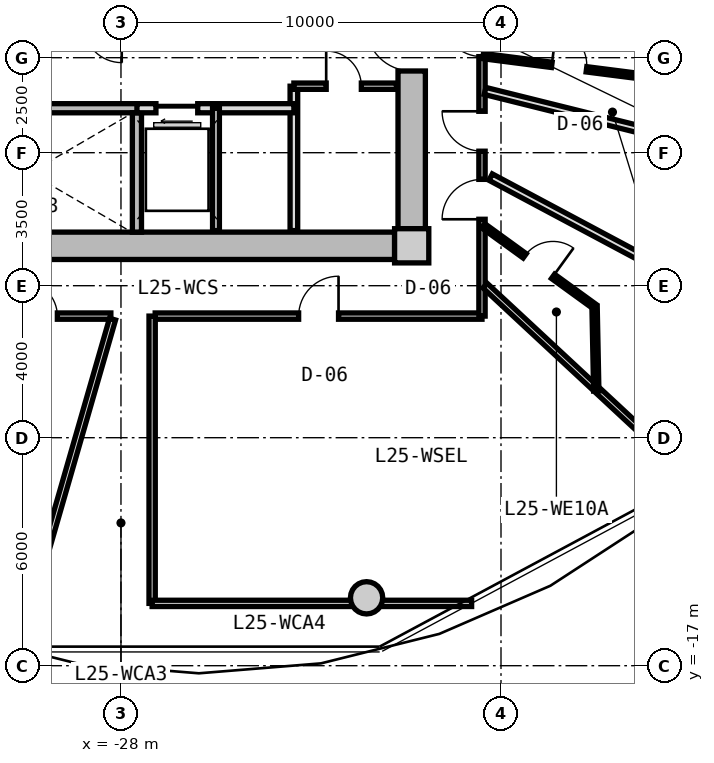
"""IFC4 building model, lengths in metres.
Left out: names, types, materials, properties, quantities, classifications, styles, units other than length and angle.
Written with IfcOpenShell. Run it as: python <this file> out.ifc"""

import sys

from ifc_helpers import new_model, si_unit, direction, frame, frame_2d, origin, origin_2d, place, context, subcontext, project, spatial, rectangle, circle, extrude, source, transform, mapped, element, fill, save


model = new_model("IFC4")
c1 = context("Model", 3, precision=1e-05, world=origin(), true_north=direction((0.0, 1.0)))
c2 = subcontext(c1, "Body", "Model", "MODEL_VIEW")
j1 = project(units=[si_unit("LENGTHUNIT", "METRE"), si_unit("PLANEANGLEUNIT", "RADIAN")], contexts=[c1])
p1 = place(None, origin())
s1 = spatial("IfcSite", under=j1, at=p1, CompositionType="ELEMENT")
p2 = place(p1, origin())
s2 = spatial("IfcBuilding", under=s1, at=p2, CompositionType="ELEMENT")
p3 = place(p2, frame((0.0, 0.0, 84.05)))
s3 = spatial("IfcBuildingStorey", under=s2, at=p3, CompositionType="ELEMENT", Elevation=84.05)
m1 = source(origin(), c2, "Body", "SweptSolid", [
    extrude(rectangle(XDim=0.9, YDim=0.9, at=origin_2d()), origin(), (0.0, 0.0, 1.0), 3.05),
])
p4 = place(p3, frame((-20.35, -5.95, 0.0), z_axis=(0.0, 0.0, 1.0), x_axis=(1.0, 0.0, 0.0)))
e1 = element("IfcColumn", 1, at=p4, inside=s3, PredefinedType="COLUMN", context=c2, shape_type="MappedRepresentation", body=[
    mapped(m1, transform((0.0, 0.0, 0.0), x_axis=(1.0, 0.0, 0.0), y_axis=(0.0, 1.0, 0.0), z_axis=(0.0, 0.0, 1.0), scale=1.0)),
])
m2 = source(origin(), c2, "Body", "SweptSolid", [
    extrude(rectangle(XDim=14.4, YDim=0.72, at=frame_2d((7.2, 0.0))), origin(), (0.0, 0.0, 1.0), 2.79),
])
p5 = place(p3, frame((-20.8, -5.95, 0.0), z_axis=(0.0, 0.0, 1.0), x_axis=(-1.0, 0.0, 0.0)))
e2 = element("IfcWall", 2, at=p5, inside=s3, PredefinedType="SHEAR", context=c2, shape_type="MappedRepresentation", body=[
    mapped(m2, transform((0.0, 0.0, 0.0), x_axis=(1.0, 0.0, 0.0), y_axis=(0.0, 1.0, 0.0), z_axis=(0.0, 0.0, 1.0), scale=1.0)),
])
m3 = source(origin(), c2, "Body", "SweptSolid", [
    extrude(rectangle(XDim=11.0, YDim=0.72, at=frame_2d((5.5, 0.0))), origin(), (0.0, 0.0, 1.0), 2.79),
])
p6 = place(p3, frame((-20.35, 5.5, 0.0), z_axis=(0.0, 0.0, 1.0), x_axis=(0.0, -1.0, 0.0)))
e3 = element("IfcWall", 3, at=p6, inside=s3, PredefinedType="SHEAR", context=c2, shape_type="MappedRepresentation", body=[
    mapped(m3, transform((0.0, 0.0, 0.0), x_axis=(1.0, 0.0, 0.0), y_axis=(0.0, 1.0, 0.0), z_axis=(0.0, 0.0, 1.0), scale=1.0)),
])
p7 = place(p6, frame((5.65, 0.0, 0.0)))
e4 = element("IfcOpeningElement", 4, at=p7, cuts=e3, PredefinedType="OPENING", context=c2, shape_type="SweptSolid", body=[
    extrude(rectangle(XDim=1.2, YDim=2.15, at=frame_2d((0.6, 1.075))), frame((0.0, 0.37, 0.0), z_axis=(0.0, -1.0, 0.0), x_axis=(1.0, 0.0, 0.0)), (0.0, 0.0, 1.0), 0.74),
])
m4 = source(origin(), c2, "Body", "SweptSolid", [
    extrude(circle(Radius=0.425, at=origin_2d()), origin(), (0.0, 0.0, 1.0), 3.05),
])
p8 = place(p3, frame((-21.537, -15.213, 0.0), z_axis=(0.0, 0.0, 1.0), x_axis=(1.0, 0.0, 0.0)))
e5 = element("IfcColumn", 5, at=p8, inside=s3, PredefinedType="COLUMN", context=c2, shape_type="MappedRepresentation", body=[
    mapped(m4, transform((0.0, 0.0, 0.0), x_axis=(1.0, 0.0, 0.0), y_axis=(0.0, 1.0, 0.0), z_axis=(0.0, 0.0, 1.0), scale=1.0)),
])
m5 = source(origin(), c2, "Body", "SweptSolid", [
    extrude(rectangle(XDim=7.83, YDim=0.24, at=frame_2d((3.915, 0.0))), origin(), (0.0, 0.0, 1.0), 2.79),
])
p9 = place(p3, frame((-35.29, -2.33, 0.0), z_axis=(0.0, 0.0, 1.0), x_axis=(1.0, 0.0, 0.0)))
e6 = element("IfcWall", 6, at=p9, inside=s3, PredefinedType="PARTITIONING", context=c2, shape_type="MappedRepresentation", body=[
    mapped(m5, transform((0.0, 0.0, 0.0), x_axis=(1.0, 0.0, 0.0), y_axis=(0.0, 1.0, 0.0), z_axis=(0.0, 0.0, 1.0), scale=1.0)),
])
p10 = place(p9, frame((0.95, 0.0, 0.0)))
e7 = element("IfcOpeningElement", 7, at=p10, cuts=e6, PredefinedType="OPENING", context=c2, shape_type="SweptSolid", body=[
    extrude(rectangle(XDim=1.1, YDim=2.15, at=frame_2d((0.55, 1.075))), frame((0.0, 0.13, 0.0), z_axis=(0.0, -1.0, 0.0), x_axis=(1.0, 0.0, 0.0)), (0.0, 0.0, 1.0), 0.26),
])
m6 = source(origin(), c2, "Body", "SweptSolid", [
    extrude(rectangle(XDim=3.14, YDim=0.24, at=frame_2d((1.57, 0.0))), origin(), (0.0, 0.0, 1.0), 2.79),
])
p11 = place(p3, frame((-27.58, -5.59, 0.0), z_axis=(0.0, 0.0, 1.0), x_axis=(0.0, 1.0, 0.0)))
e8 = element("IfcWall", 8, at=p11, inside=s3, PredefinedType="PARTITIONING", context=c2, shape_type="MappedRepresentation", body=[
    mapped(m6, transform((0.0, 0.0, 0.0), x_axis=(1.0, 0.0, 0.0), y_axis=(0.0, 1.0, 0.0), z_axis=(0.0, 0.0, 1.0), scale=1.0)),
])
m7 = source(origin(), c2, "Body", "SweptSolid", [
    extrude(rectangle(XDim=3.8, YDim=0.2, at=frame_2d((1.9, 0.0))), origin(), (0.0, 0.0, 1.0), 2.775),
])
p12 = place(p3, frame((-23.45, -5.55, 0.0), z_axis=(0.0, 0.0, 1.0), x_axis=(0.0, 1.0, 0.0)))
e9 = element("IfcWall", 9, at=p12, inside=s3, PredefinedType="PARTITIONING", context=c2, shape_type="MappedRepresentation", body=[
    mapped(m7, transform((0.0, 0.0, 0.0), x_axis=(1.0, 0.0, 0.0), y_axis=(0.0, 1.0, 0.0), z_axis=(0.0, 0.0, 1.0), scale=1.0)),
])
m8 = source(origin(), c2, "Body", "SweptSolid", [
    extrude(rectangle(XDim=4.13, YDim=0.24, at=frame_2d((2.065, 0.0))), origin(), (0.0, 0.0, 1.0), 2.775),
])
p13 = place(p3, frame((-27.58, -2.33, 0.0), z_axis=(0.0, 0.0, 1.0), x_axis=(1.0, 0.0, 0.0)))
e10 = element("IfcWall", 10, at=p13, inside=s3, PredefinedType="PARTITIONING", context=c2, shape_type="MappedRepresentation", body=[
    mapped(m8, transform((0.0, 0.0, 0.0), x_axis=(1.0, 0.0, 0.0), y_axis=(0.0, 1.0, 0.0), z_axis=(0.0, 0.0, 1.0), scale=1.0)),
])
p14 = place(p13, frame((0.5, 0.0, 0.0)))
e11 = element("IfcOpeningElement", 11, at=p14, cuts=e10, PredefinedType="OPENING", context=c2, shape_type="SweptSolid", body=[
    extrude(rectangle(XDim=1.1, YDim=2.2, at=frame_2d((0.55, 1.1))), frame((0.0, 0.13, 0.0), z_axis=(0.0, -1.0, 0.0), x_axis=(1.0, 0.0, 0.0)), (0.0, 0.0, 1.0), 0.26),
])
m9 = source(origin(), c2, "Body", "SweptSolid", [
    extrude(rectangle(XDim=3.22, YDim=0.18, at=frame_2d((1.61, 0.0))), origin(), (0.0, 0.0, 1.0), 2.775),
])
p15 = place(p3, frame((-25.5, -5.55, 0.0), z_axis=(0.0, 0.0, 1.0), x_axis=(0.0, 1.0, 0.0)))
e12 = element("IfcWall", 12, at=p15, inside=s3, PredefinedType="PARTITIONING", context=c2, shape_type="MappedRepresentation", body=[
    mapped(m9, transform((0.0, 0.0, 0.0), x_axis=(1.0, 0.0, 0.0), y_axis=(0.0, 1.0, 0.0), z_axis=(0.0, 0.0, 1.0), scale=1.0)),
])
m10 = source(origin(), c2, "Body", "SweptSolid", [
    extrude(rectangle(XDim=2.7, YDim=0.165, at=frame_2d((1.35, 0.0))), origin(), (0.0, 0.0, 1.0), 2.775),
])
p16 = place(p3, frame((-23.45, -1.75, 0.0), z_axis=(0.0, 0.0, 1.0), x_axis=(1.0, 0.0, 0.0)))
e13 = element("IfcWall", 13, at=p16, inside=s3, PredefinedType="PARTITIONING", context=c2, shape_type="MappedRepresentation", body=[
    mapped(m10, transform((0.0, 0.0, 0.0), x_axis=(1.0, 0.0, 0.0), y_axis=(0.0, 1.0, 0.0), z_axis=(0.0, 0.0, 1.0), scale=1.0)),
])
p17 = place(p16, frame((0.85, 0.0, 0.0)))
e14 = element("IfcOpeningElement", 14, at=p17, cuts=e13, PredefinedType="OPENING", context=c2, shape_type="SweptSolid", body=[
    extrude(rectangle(XDim=0.925, YDim=2.1, at=frame_2d((0.462, 1.05))), frame((0.0, 0.093, 0.0), z_axis=(0.0, -1.0, 0.0), x_axis=(1.0, 0.0, 0.0)), (0.0, 0.0, 1.0), 0.185),
])
m11 = source(origin(), c2, "Body", "SweptSolid", [
    extrude(rectangle(XDim=8.6, YDim=0.165, at=frame_2d((4.3, 0.0))), origin(), (0.0, 0.0, 1.0), 2.775),
])
p18 = place(p3, frame((-18.5, -7.8, 0.0), z_axis=(0.0, 0.0, 1.0), x_axis=(-1.0, 0.0, 0.0)))
e15 = element("IfcWall", 15, at=p18, inside=s3, PredefinedType="PARTITIONING", context=c2, shape_type="MappedRepresentation", body=[
    mapped(m11, transform((0.0, 0.0, 0.0), x_axis=(1.0, 0.0, 0.0), y_axis=(0.0, 1.0, 0.0), z_axis=(0.0, 0.0, 1.0), scale=1.0)),
])
p19 = place(p18, frame((3.775, 0.0, 0.0)))
e16 = element("IfcOpeningElement", 16, at=p19, cuts=e15, PredefinedType="OPENING", context=c2, shape_type="SweptSolid", body=[
    extrude(rectangle(XDim=1.05, YDim=2.15, at=frame_2d((0.525, 1.075))), frame((0.0, 0.093, 0.0), z_axis=(0.0, -1.0, 0.0), x_axis=(1.0, 0.0, 0.0)), (0.0, 0.0, 1.0), 0.185),
])
m12 = source(origin(), c2, "Body", "SweptSolid", [
    extrude(rectangle(XDim=9.234, YDim=0.165, at=frame_2d((4.617, 0.0))), origin(), (0.0, 0.0, 1.0), 2.775),
])
p20 = place(p3, frame((-28.266, -7.8, 0.0), z_axis=(0.0, 0.0, 1.0), x_axis=(-1.0, 0.0, 0.0)))
e17 = element("IfcWall", 17, at=p20, inside=s3, PredefinedType="PARTITIONING", context=c2, shape_type="MappedRepresentation", body=[
    mapped(m12, transform((0.0, 0.0, 0.0), x_axis=(1.0, 0.0, 0.0), y_axis=(0.0, 1.0, 0.0), z_axis=(0.0, 0.0, 1.0), scale=1.0)),
])
p21 = place(p20, frame((4.392, 0.0, 0.0)))
e18 = element("IfcOpeningElement", 18, at=p21, cuts=e17, PredefinedType="OPENING", context=c2, shape_type="SweptSolid", body=[
    extrude(rectangle(XDim=0.92, YDim=2.1, at=frame_2d((0.46, 1.05))), frame((0.0, 0.093, 0.0), z_axis=(0.0, -1.0, 0.0), x_axis=(1.0, 0.0, 0.0)), (0.0, 0.0, 1.0), 0.185),
])
p22 = place(p20, frame((1.408, 0.0, 0.0)))
e19 = element("IfcOpeningElement", 19, at=p22, cuts=e17, PredefinedType="OPENING", context=c2, shape_type="SweptSolid", body=[
    extrude(rectangle(XDim=0.92, YDim=2.1, at=frame_2d((0.46, 1.05))), frame((0.0, 0.093, 0.0), z_axis=(0.0, -1.0, 0.0), x_axis=(1.0, 0.0, 0.0)), (0.0, 0.0, 1.0), 0.185),
])
m13 = source(origin(), c2, "Body", "SweptSolid", [
    extrude(rectangle(XDim=15.6, YDim=0.165, at=frame_2d((7.8, 0.0))), origin(), (0.0, 0.0, 1.0), 2.775),
])
p23 = place(p3, frame((-18.5, 7.8, 0.0), z_axis=(0.0, 0.0, 1.0), x_axis=(0.0, -1.0, 0.0)))
e20 = element("IfcWall", 20, at=p23, inside=s3, PredefinedType="PARTITIONING", context=c2, shape_type="MappedRepresentation", body=[
    mapped(m13, transform((0.0, 0.0, 0.0), x_axis=(1.0, 0.0, 0.0), y_axis=(0.0, 1.0, 0.0), z_axis=(0.0, 0.0, 1.0), scale=1.0)),
])
p24 = place(p23, frame((12.002, 0.0, 0.0)))
e21 = element("IfcOpeningElement", 21, at=p24, cuts=e20, PredefinedType="OPENING", context=c2, shape_type="SweptSolid", body=[
    extrude(rectangle(XDim=1.05, YDim=2.15, at=frame_2d((0.525, 1.075))), frame((0.0, 0.093, 0.0), z_axis=(0.0, -1.0, 0.0), x_axis=(1.0, 0.0, 0.0)), (0.0, 0.0, 1.0), 0.185),
])
p25 = place(p23, frame((10.211, 0.0, 0.0)))
e22 = element("IfcOpeningElement", 22, at=p25, cuts=e20, PredefinedType="OPENING", context=c2, shape_type="SweptSolid", body=[
    extrude(rectangle(XDim=1.05, YDim=2.15, at=frame_2d((0.525, 1.075))), frame((0.0, 0.093, 0.0), z_axis=(0.0, -1.0, 0.0), x_axis=(1.0, 0.0, 0.0)), (0.0, 0.0, 1.0), 0.185),
])
p26 = place(p23, frame((7.722, 0.0, 0.0)))
e23 = element("IfcOpeningElement", 23, at=p26, cuts=e20, PredefinedType="OPENING", context=c2, shape_type="SweptSolid", body=[
    extrude(rectangle(XDim=1.05, YDim=2.15, at=frame_2d((0.525, 1.075))), frame((0.0, 0.093, 0.0), z_axis=(0.0, -1.0, 0.0), x_axis=(1.0, 0.0, 0.0)), (0.0, 0.0, 1.0), 0.185),
])
p27 = place(p23, frame((6.291, 0.0, 0.0)))
e24 = element("IfcOpeningElement", 24, at=p27, cuts=e20, PredefinedType="OPENING", context=c2, shape_type="SweptSolid", body=[
    extrude(rectangle(XDim=1.05, YDim=2.15, at=frame_2d((0.525, 1.075))), frame((0.0, 0.093, 0.0), z_axis=(0.0, -1.0, 0.0), x_axis=(1.0, 0.0, 0.0)), (0.0, 0.0, 1.0), 0.185),
])
p28 = place(p23, frame((4.296, 0.0, 0.0)))
e25 = element("IfcOpeningElement", 25, at=p28, cuts=e20, PredefinedType="OPENING", context=c2, shape_type="SweptSolid", body=[
    extrude(rectangle(XDim=1.05, YDim=2.15, at=frame_2d((0.525, 1.075))), frame((0.0, 0.093, 0.0), z_axis=(0.0, -1.0, 0.0), x_axis=(1.0, 0.0, 0.0)), (0.0, 0.0, 1.0), 0.185),
])
p29 = place(p23, frame((1.654, 0.0, 0.0)))
e26 = element("IfcOpeningElement", 26, at=p29, cuts=e20, PredefinedType="OPENING", context=c2, shape_type="SweptSolid", body=[
    extrude(rectangle(XDim=1.05, YDim=2.15, at=frame_2d((0.525, 1.075))), frame((0.0, 0.093, 0.0), z_axis=(0.0, -1.0, 0.0), x_axis=(1.0, 0.0, 0.0)), (0.0, 0.0, 1.0), 0.185),
])
m14 = source(origin(), c2, "Body", "SweptSolid", [
    extrude(rectangle(XDim=8.989, YDim=0.165, at=frame_2d((4.495, 0.0))), origin(), (0.0, 0.0, 1.0), 2.275),
])
p30 = place(p3, frame((-28.222, -7.88, 0.0), z_axis=(0.0, 0.0, 1.0), x_axis=(-0.27702323008, -0.960863221274, 0.0)))
e27 = element("IfcWall", 27, at=p30, inside=s3, PredefinedType="PARTITIONING", context=c2, shape_type="MappedRepresentation", body=[
    mapped(m14, transform((0.0, 0.0, 0.0), x_axis=(1.0, 0.0, 0.0), y_axis=(0.0, 1.0, 0.0), z_axis=(0.0, 0.0, 1.0), scale=1.0)),
])
m15 = source(origin(), c2, "Body", "SweptSolid", [
    extrude(rectangle(XDim=7.482, YDim=0.165, at=frame_2d((3.741, 0.0))), origin(), (0.0, 0.0, 1.0), 2.275),
])
p31 = place(p3, frame((-18.42, -6.998, 0.0), z_axis=(0.0, 0.0, 1.0), x_axis=(0.732508698043, -0.680757671489, 0.0)))
e28 = element("IfcWall", 28, at=p31, inside=s3, PredefinedType="PARTITIONING", context=c2, shape_type="MappedRepresentation", body=[
    mapped(m15, transform((0.0, 0.0, 0.0), x_axis=(1.0, 0.0, 0.0), y_axis=(0.0, 1.0, 0.0), z_axis=(0.0, 0.0, 1.0), scale=1.0)),
])
m16 = source(origin(), c2, "Body", "SweptSolid", [
    extrude(rectangle(XDim=7.56, YDim=0.165, at=frame_2d((3.78, 0.0))), origin(), (0.0, 0.0, 1.0), 2.775),
])
p32 = place(p3, frame((-27.18, -15.36, 0.0), z_axis=(0.0, 0.0, 1.0), x_axis=(0.0, 1.0, 0.0)))
e29 = element("IfcWall", 29, at=p32, inside=s3, PredefinedType="PARTITIONING", context=c2, shape_type="MappedRepresentation", body=[
    mapped(m16, transform((0.0, 0.0, 0.0), x_axis=(1.0, 0.0, 0.0), y_axis=(0.0, 1.0, 0.0), z_axis=(0.0, 0.0, 1.0), scale=1.0)),
])
m17 = source(origin(), c2, "Body", "SweptSolid", [
    extrude(rectangle(XDim=8.407, YDim=0.165, at=frame_2d((4.204, 0.0))), origin(), (0.0, 0.0, 1.0), 2.275),
])
p33 = place(p3, frame((-27.18, -15.36, 0.0), z_axis=(0.0, 0.0, 1.0), x_axis=(1.0, 0.0, 0.0)))
e30 = element("IfcWall", 30, at=p33, inside=s3, PredefinedType="PARTITIONING", context=c2, shape_type="MappedRepresentation", body=[
    mapped(m17, transform((0.0, 0.0, 0.0), x_axis=(1.0, 0.0, 0.0), y_axis=(0.0, 1.0, 0.0), z_axis=(0.0, 0.0, 1.0), scale=1.0)),
])
m18 = source(origin(), c2, "Body", "SweptSolid", [
    extrude(rectangle(XDim=10.556, YDim=0.19, at=frame_2d((5.278, 0.0))), origin(), (0.0, 0.0, 1.0), 2.275),
])
p34 = place(p3, frame((-18.42, -1.875, 0.0), z_axis=(0.0, 0.0, 1.0), x_axis=(0.970363857851, -0.241648470667, 0.0)))
e31 = element("IfcWall", 31, at=p34, inside=s3, PredefinedType="PARTITIONING", context=c2, shape_type="MappedRepresentation", body=[
    mapped(m18, transform((0.0, 0.0, 0.0), x_axis=(1.0, 0.0, 0.0), y_axis=(0.0, 1.0, 0.0), z_axis=(0.0, 0.0, 1.0), scale=1.0)),
])
m19 = source(origin(), c2, "Body", "SweptSolid", [
    extrude(rectangle(XDim=8.744, YDim=0.19, at=frame_2d((4.372, 0.0))), origin(), (0.0, 0.0, 1.0), 2.775),
])
p35 = place(p3, frame((-18.273, -4.142, 0.0), z_axis=(0.0, 0.0, 1.0), x_axis=(0.882252449936, -0.470776607938, 0.0)))
e32 = element("IfcWall", 32, at=p35, inside=s3, PredefinedType="PARTITIONING", context=c2, shape_type="MappedRepresentation", body=[
    mapped(m19, transform((0.0, 0.0, 0.0), x_axis=(1.0, 0.0, 0.0), y_axis=(0.0, 1.0, 0.0), z_axis=(0.0, 0.0, 1.0), scale=1.0)),
])
m20 = source(origin(), c2, "Body", "SweptSolid", [
    extrude(rectangle(XDim=3.621, YDim=0.14, at=frame_2d((1.811, 0.0))), origin(), (0.0, 0.0, 1.0), 2.775),
])
p36 = place(p3, frame((-18.47, -5.422, 0.0), z_axis=(0.0, 0.0, 1.0), x_axis=(0.80968252222, -0.586868139544, 0.0)))
e33 = element("IfcWall", 33, at=p36, inside=s3, PredefinedType="PARTITIONING", context=c2, shape_type="MappedRepresentation", body=[
    mapped(m20, transform((0.0, 0.0, 0.0), x_axis=(1.0, 0.0, 0.0), y_axis=(0.0, 1.0, 0.0), z_axis=(0.0, 0.0, 1.0), scale=1.0)),
])
p37 = place(p36, frame((1.351, 0.0, 0.0)))
e34 = element("IfcOpeningElement", 34, at=p37, cuts=e33, PredefinedType="OPENING", context=c2, shape_type="SweptSolid", body=[
    extrude(rectangle(XDim=0.92, YDim=2.1, at=frame_2d((0.46, 1.05))), frame((0.0, 0.08, 0.0), z_axis=(0.0, -1.0, 0.0), x_axis=(1.0, 0.0, 0.0)), (0.0, 0.0, 1.0), 0.16),
])
m21 = source(origin(), c2, "Body", "SweptSolid", [
    extrude(rectangle(XDim=2.225, YDim=0.14, at=frame_2d((1.112, 0.0))), origin(), (0.0, 0.0, 1.0), 2.775),
])
p38 = place(p3, frame((-15.538, -7.547, 0.0), z_axis=(0.0, 0.0, 1.0), x_axis=(0.019971869027, -0.999800542332, 0.0)))
e35 = element("IfcWall", 35, at=p38, inside=s3, PredefinedType="PARTITIONING", context=c2, shape_type="MappedRepresentation", body=[
    mapped(m21, transform((0.0, 0.0, 0.0), x_axis=(1.0, 0.0, 0.0), y_axis=(0.0, 1.0, 0.0), z_axis=(0.0, 0.0, 1.0), scale=1.0)),
])
m22 = source(origin(), c2, "Body", "SweptSolid", [
    extrude(rectangle(XDim=4.562, YDim=0.14, at=frame_2d((2.281, 0.0))), origin(), (0.0, 0.0, 1.0), 2.775),
])
p39 = place(p3, frame((-18.47, -0.958, 0.0), z_axis=(0.0, 0.0, 1.0), x_axis=(0.991904666356, -0.126984774129, 0.0)))
e36 = element("IfcWall", 36, at=p39, inside=s3, PredefinedType="PARTITIONING", context=c2, shape_type="MappedRepresentation", body=[
    mapped(m22, transform((0.0, 0.0, 0.0), x_axis=(1.0, 0.0, 0.0), y_axis=(0.0, 1.0, 0.0), z_axis=(0.0, 0.0, 1.0), scale=1.0)),
])
p40 = place(p39, frame((1.821, 0.0, 0.0)))
e37 = element("IfcOpeningElement", 37, at=p40, cuts=e36, PredefinedType="OPENING", context=c2, shape_type="SweptSolid", body=[
    extrude(rectangle(XDim=0.92, YDim=2.1, at=frame_2d((0.46, 1.05))), frame((0.0, 0.08, 0.0), z_axis=(0.0, -1.0, 0.0), x_axis=(1.0, 0.0, 0.0)), (0.0, 0.0, 1.0), 0.16),
])
m23 = source(origin(), c2, "Body", "SweptSolid", [
    extrude(rectangle(XDim=1.2, YDim=2.15, at=frame_2d((0.6, 1.075))), frame((0.0, 0.025, 0.0), z_axis=(0.0, -1.0, 0.0), x_axis=(1.0, 0.0, 0.0)), (0.0, 0.0, 1.0), 0.05),
])
p41 = place(p7, frame((1.2, 0.0, 0.0), z_axis=(0.0, 0.0, 1.0), x_axis=(-1.0, 0.0, 0.0)))
e38 = element("IfcDoor", 38, at=p41, inside=s3, OperationType="SINGLE_SWING_RIGHT", PredefinedType="DOOR", context=c2, shape_type="MappedRepresentation", body=[
    mapped(m23, transform((0.0, 0.0, 0.0), x_axis=(1.0, 0.0, 0.0), y_axis=(0.0, 1.0, 0.0), z_axis=(0.0, 0.0, 1.0), scale=1.0)),
])
fill(e4, e38)
m24 = source(origin(), c2, "Body", "SweptSolid", [
    extrude(rectangle(XDim=1.1, YDim=2.2, at=frame_2d((0.55, 1.1))), frame((0.0, 0.025, 0.0), z_axis=(0.0, -1.0, 0.0), x_axis=(1.0, 0.0, 0.0)), (0.0, 0.0, 1.0), 0.05),
])
p42 = place(p14, frame((1.1, 0.0, 0.0), z_axis=(0.0, 0.0, 1.0), x_axis=(-1.0, 0.0, 0.0)))
e39 = element("IfcDoor", 39, at=p42, inside=s3, OperationType="SLIDING_TO_LEFT", PredefinedType="DOOR", context=c2, shape_type="MappedRepresentation", body=[
    mapped(m24, transform((0.0, 0.0, 0.0), x_axis=(1.0, 0.0, 0.0), y_axis=(0.0, 1.0, 0.0), z_axis=(0.0, 0.0, 1.0), scale=1.0)),
])
fill(e11, e39)
m25 = source(origin(), c2, "Body", "SweptSolid", [
    extrude(rectangle(XDim=0.925, YDim=2.1, at=frame_2d((0.462, 1.05))), frame((0.0, 0.025, 0.0), z_axis=(0.0, -1.0, 0.0), x_axis=(1.0, 0.0, 0.0)), (0.0, 0.0, 1.0), 0.05),
])
p43 = place(p17, origin())
e40 = element("IfcDoor", 40, at=p43, inside=s3, OperationType="SINGLE_SWING_LEFT", PredefinedType="DOOR", context=c2, shape_type="MappedRepresentation", body=[
    mapped(m25, transform((0.0, 0.0, 0.0), x_axis=(1.0, 0.0, 0.0), y_axis=(0.0, 1.0, 0.0), z_axis=(0.0, 0.0, 1.0), scale=1.0)),
])
fill(e14, e40)
m26 = source(origin(), c2, "Body", "SweptSolid", [
    extrude(rectangle(XDim=1.05, YDim=2.15, at=frame_2d((0.525, 1.075))), frame((0.0, 0.025, 0.0), z_axis=(0.0, -1.0, 0.0), x_axis=(1.0, 0.0, 0.0)), (0.0, 0.0, 1.0), 0.05),
])
p44 = place(p19, frame((1.05, 0.0, 0.0), z_axis=(0.0, 0.0, 1.0), x_axis=(-1.0, 0.0, 0.0)))
e41 = element("IfcDoor", 41, at=p44, inside=s3, OperationType="SINGLE_SWING_RIGHT", PredefinedType="DOOR", context=c2, shape_type="MappedRepresentation", body=[
    mapped(m26, transform((0.0, 0.0, 0.0), x_axis=(1.0, 0.0, 0.0), y_axis=(0.0, 1.0, 0.0), z_axis=(0.0, 0.0, 1.0), scale=1.0)),
])
fill(e16, e41)
m27 = source(origin(), c2, "Body", "SweptSolid", [
    extrude(rectangle(XDim=0.92, YDim=2.1, at=frame_2d((0.46, 1.05))), frame((0.0, 0.025, 0.0), z_axis=(0.0, -1.0, 0.0), x_axis=(1.0, 0.0, 0.0)), (0.0, 0.0, 1.0), 0.05),
])
p45 = place(p22, frame((0.92, 0.0, 0.0), z_axis=(0.0, 0.0, 1.0), x_axis=(-1.0, 0.0, 0.0)))
e42 = element("IfcDoor", 42, at=p45, inside=s3, OperationType="SINGLE_SWING_LEFT", PredefinedType="DOOR", context=c2, shape_type="MappedRepresentation", body=[
    mapped(m27, transform((0.0, 0.0, 0.0), x_axis=(1.0, 0.0, 0.0), y_axis=(0.0, 1.0, 0.0), z_axis=(0.0, 0.0, 1.0), scale=1.0)),
])
fill(e19, e42)
p46 = place(p24, frame((1.05, 0.0, 0.0), z_axis=(0.0, 0.0, 1.0), x_axis=(-1.0, 0.0, 0.0)))
e43 = element("IfcDoor", 43, at=p46, inside=s3, OperationType="SINGLE_SWING_LEFT", PredefinedType="DOOR", context=c2, shape_type="MappedRepresentation", body=[
    mapped(m26, transform((0.0, 0.0, 0.0), x_axis=(1.0, 0.0, 0.0), y_axis=(0.0, 1.0, 0.0), z_axis=(0.0, 0.0, 1.0), scale=1.0)),
])
fill(e21, e43)
p47 = place(p37, origin())
e44 = element("IfcDoor", 44, at=p47, inside=s3, OperationType="SINGLE_SWING_RIGHT", PredefinedType="DOOR", context=c2, shape_type="MappedRepresentation", body=[
    mapped(m27, transform((0.0, 0.0, 0.0), x_axis=(1.0, 0.0, 0.0), y_axis=(0.0, 1.0, 0.0), z_axis=(0.0, 0.0, 1.0), scale=1.0)),
])
fill(e34, e44)
p48 = place(p25, frame((1.05, 0.0, 0.0), z_axis=(0.0, 0.0, 1.0), x_axis=(-1.0, 0.0, 0.0)))
e45 = element("IfcDoor", 45, at=p48, inside=s3, OperationType="SINGLE_SWING_RIGHT", PredefinedType="DOOR", context=c2, shape_type="MappedRepresentation", body=[
    mapped(m26, transform((0.0, 0.0, 0.0), x_axis=(1.0, 0.0, 0.0), y_axis=(0.0, 1.0, 0.0), z_axis=(0.0, 0.0, 1.0), scale=1.0)),
])
fill(e22, e45)
p49 = place(p26, frame((1.05, 0.0, 0.0), z_axis=(0.0, 0.0, 1.0), x_axis=(-1.0, 0.0, 0.0)))
e46 = element("IfcDoor", 46, at=p49, inside=s3, OperationType="SINGLE_SWING_RIGHT", PredefinedType="DOOR", context=c2, shape_type="MappedRepresentation", body=[
    mapped(m26, transform((0.0, 0.0, 0.0), x_axis=(1.0, 0.0, 0.0), y_axis=(0.0, 1.0, 0.0), z_axis=(0.0, 0.0, 1.0), scale=1.0)),
])
fill(e23, e46)
p50 = place(p40, origin())
e47 = element("IfcDoor", 47, at=p50, inside=s3, OperationType="SINGLE_SWING_LEFT", PredefinedType="DOOR", context=c2, shape_type="MappedRepresentation", body=[
    mapped(m27, transform((0.0, 0.0, 0.0), x_axis=(1.0, 0.0, 0.0), y_axis=(0.0, 1.0, 0.0), z_axis=(0.0, 0.0, 1.0), scale=1.0)),
])
fill(e37, e47)
save(model, sys.argv[1])
